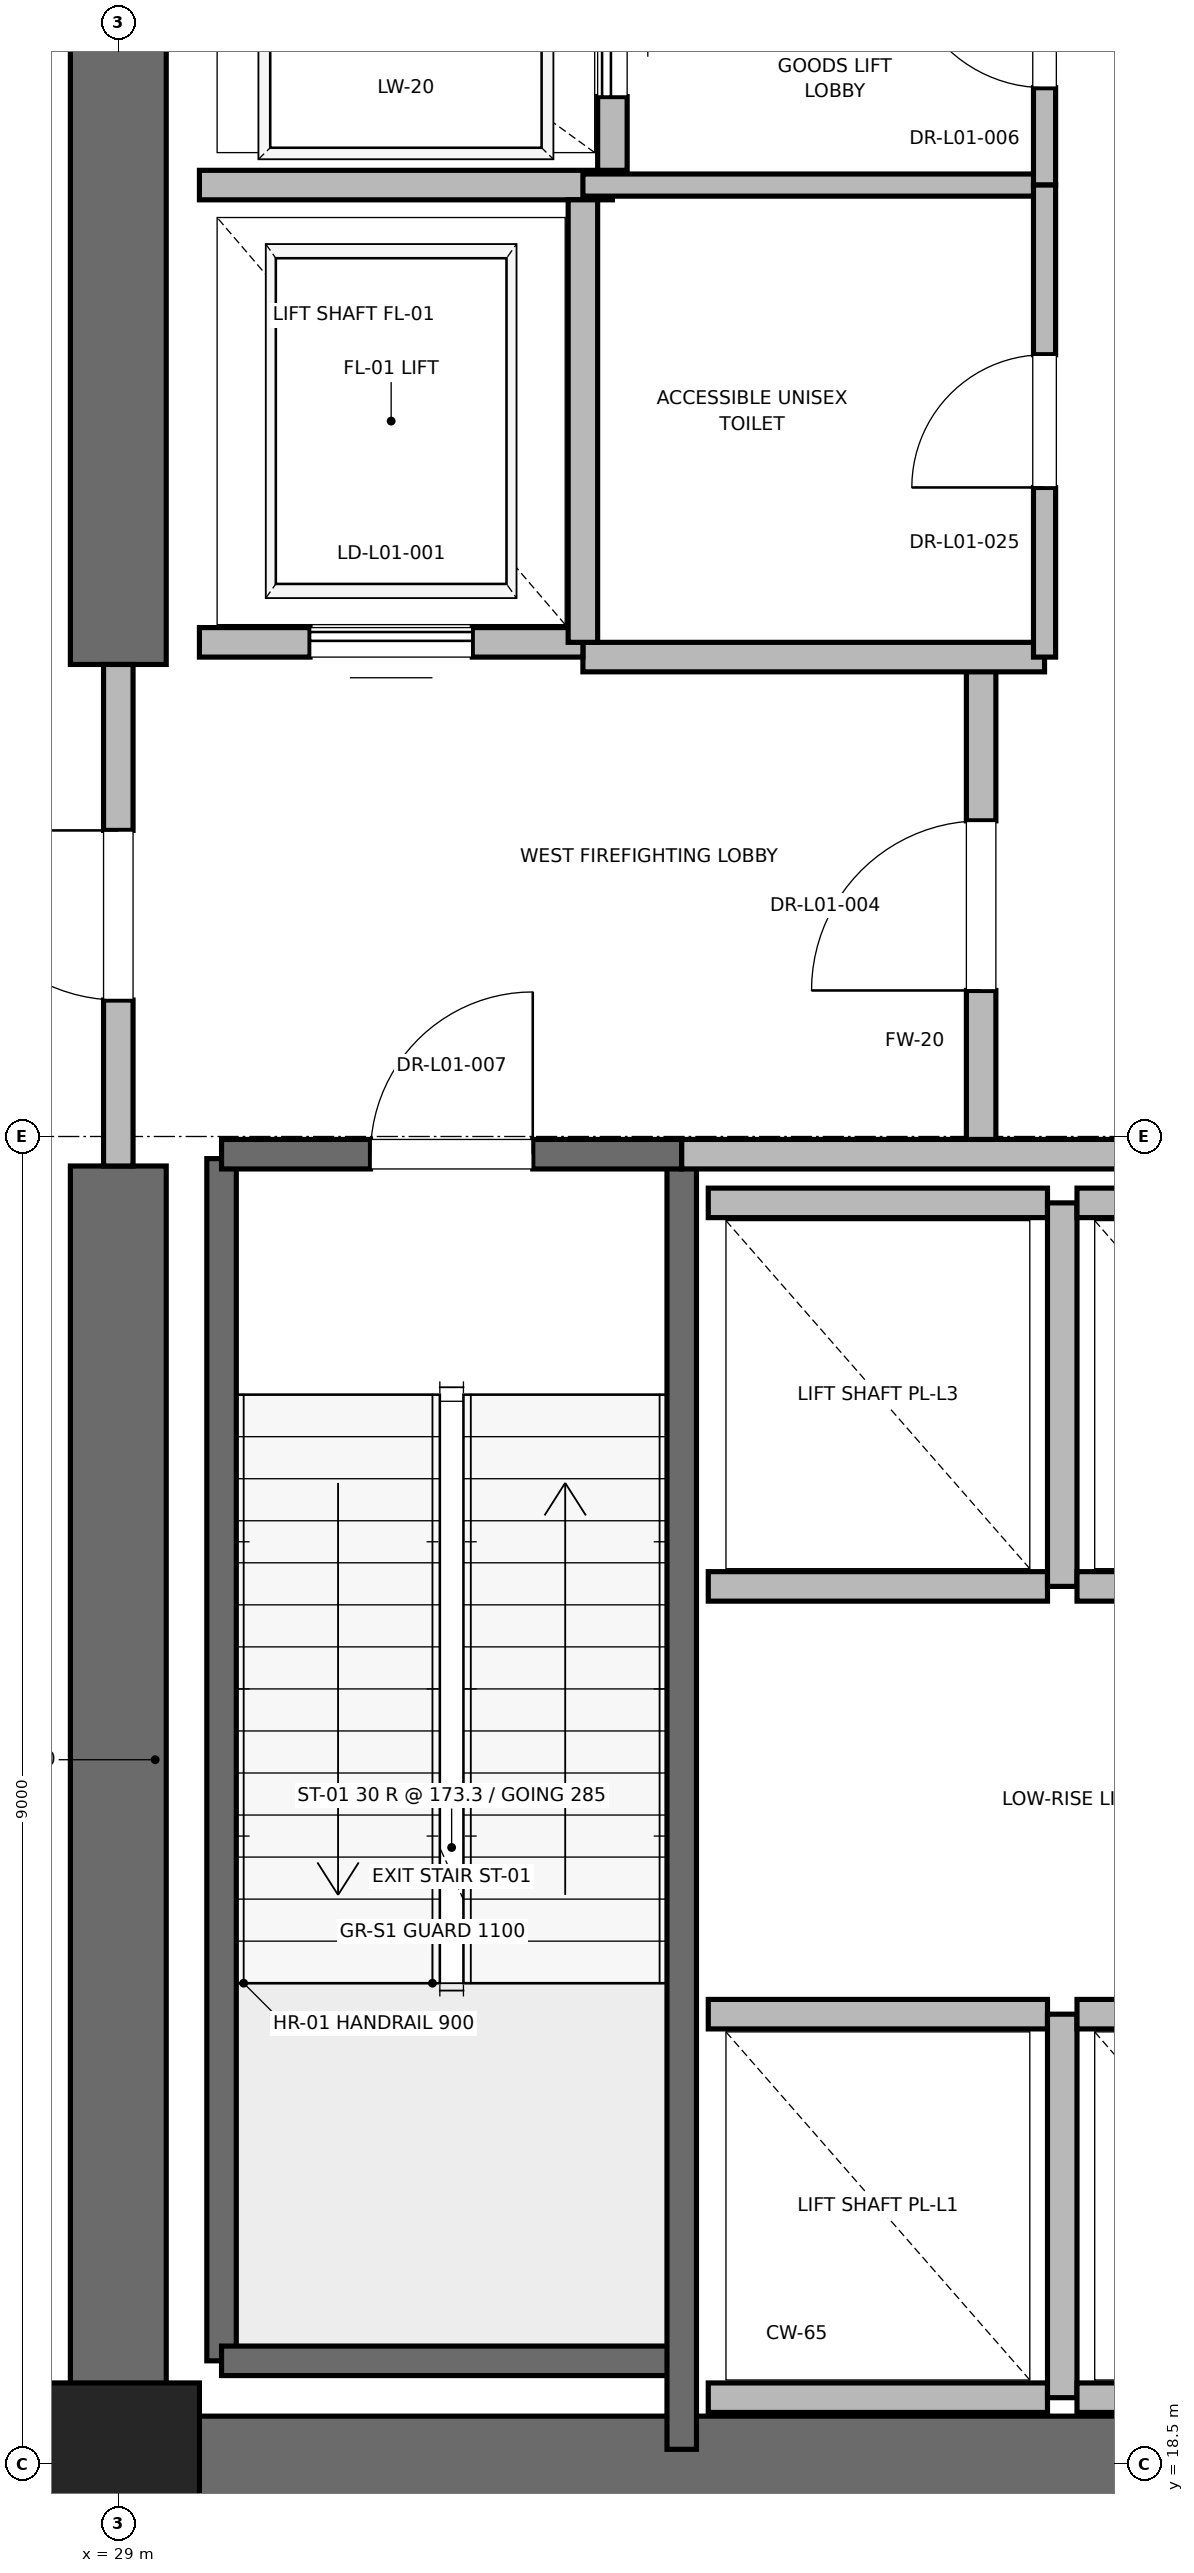
"""IFC4 building model, lengths in metres.
Left out: names, types, materials, properties, quantities, classifications, styles, units other than length and angle.
Written with IfcOpenShell. Run it as: python <this file> out.ifc"""

import sys

from ifc_helpers import new_model, si_unit, direction, frame, frame_2d, origin, origin_2d, place, context, subcontext, project, spatial, rectangle, extrude, element, fill, save


model = new_model("IFC4")
c1 = context("Model", 3, precision=1e-05, world=origin(), true_north=direction((0.0, 1.0)))
c2 = subcontext(c1, "Body", "Model", "MODEL_VIEW")
j1 = project(units=[si_unit("LENGTHUNIT", "METRE"), si_unit("PLANEANGLEUNIT", "RADIAN")], contexts=[c1])
p1 = place(None, origin())
s1 = spatial("IfcSite", under=j1, at=p1, CompositionType="ELEMENT")
p2 = place(p1, origin())
s2 = spatial("IfcBuilding", under=s1, at=p2, CompositionType="ELEMENT")
p3 = place(p2, frame((0.0, 0.0, 6.0)))
s3 = spatial("IfcBuildingStorey", under=s2, at=p3, CompositionType="ELEMENT", Elevation=6.0)
p4 = place(p3, frame((29.0, 18.5, 0.0), z_axis=(0.0, 0.0, 1.0), x_axis=(1.0, 0.0, 0.0)))
e1 = element("IfcColumn", 1, at=p4, inside=s3, PredefinedType="PILASTER", context=c2, shape_type="SweptSolid", body=[
    extrude(rectangle(XDim=1.1, YDim=1.1, at=origin_2d()), origin(), (0.0, 0.0, 1.0), 5.2),
])
p5 = place(p3, frame((29.0, 18.5, 0.0), z_axis=(0.0, 0.0, 1.0), x_axis=(1.0, 0.0, 0.0)))
e2 = element("IfcWall", 2, at=p5, inside=s3, PredefinedType="SHEAR", context=c2, shape_type="SweptSolid", body=[
    extrude(rectangle(XDim=9.2, YDim=0.65, at=frame_2d((4.6, 0.0))), origin(), (0.0, 0.0, 1.0), 4.92),
])
p6 = place(p3, frame((29.0, 18.5, 0.0), z_axis=(0.0, 0.0, 1.0), x_axis=(0.0, 1.0, 0.0)))
e3 = element("IfcWall", 3, at=p6, inside=s3, PredefinedType="SHEAR", context=c2, shape_type="SweptSolid", body=[
    extrude(rectangle(XDim=8.8, YDim=0.65, at=frame_2d((4.4, 0.0))), origin(), (0.0, 0.0, 1.0), 4.92),
])
p7 = place(p3, frame((29.0, 30.7, 0.0), z_axis=(0.0, 0.0, 1.0), x_axis=(0.0, 1.0, 0.0)))
e4 = element("IfcWall", 4, at=p7, inside=s3, PredefinedType="SHEAR", context=c2, shape_type="SweptSolid", body=[
    extrude(rectangle(XDim=5.8, YDim=0.65, at=frame_2d((2.9, 0.0))), origin(), (0.0, 0.0, 1.0), 4.92),
])
p8 = place(p3, frame((29.7, 19.2, 0.0), z_axis=(0.0, 0.0, 1.0), x_axis=(0.0, 1.0, 0.0)))
e5 = element("IfcWall", 5, at=p8, inside=s3, PredefinedType="SOLIDWALL", context=c2, shape_type="SweptSolid", body=[
    extrude(rectangle(XDim=8.15, YDim=0.2, at=frame_2d((4.075, 0.0))), origin(), (0.0, 0.0, 1.0), 4.92),
])
p9 = place(p3, frame((29.7, 19.2, 0.0), z_axis=(0.0, 0.0, 1.0), x_axis=(1.0, 0.0, 0.0)))
e6 = element("IfcWall", 6, at=p9, inside=s3, PredefinedType="SOLIDWALL", context=c2, shape_type="SweptSolid", body=[
    extrude(rectangle(XDim=3.12, YDim=0.2, at=frame_2d((1.56, 0.0))), origin(), (0.0, 0.0, 1.0), 4.92),
])
p10 = place(p3, frame((32.82, 18.6, 0.0), z_axis=(0.0, 0.0, 1.0), x_axis=(0.0, 1.0, 0.0)))
e7 = element("IfcWall", 7, at=p10, inside=s3, PredefinedType="SOLIDWALL", context=c2, shape_type="SweptSolid", body=[
    extrude(rectangle(XDim=8.78, YDim=0.2, at=frame_2d((4.39, 0.0))), origin(), (0.0, 0.0, 1.0), 4.92),
])
p11 = place(p3, frame((29.7, 27.38, 0.0), z_axis=(0.0, 0.0, 1.0), x_axis=(1.0, 0.0, 0.0)))
e8 = element("IfcWall", 8, at=p11, inside=s3, PredefinedType="SOLIDWALL", context=c2, shape_type="SweptSolid", body=[
    extrude(rectangle(XDim=3.12, YDim=0.2, at=frame_2d((1.56, 0.0))), origin(), (0.0, 0.0, 1.0), 4.92),
])
p12 = place(p11, frame((1.01, 0.0, 0.0)))
e9 = element("IfcOpeningElement", 9, at=p12, cuts=e8, PredefinedType="OPENING", context=c2, shape_type="SweptSolid", body=[
    extrude(rectangle(XDim=1.1, YDim=2.15, at=frame_2d((0.55, 1.075))), frame((0.0, 0.1, 0.0), z_axis=(0.0, -1.0, 0.0), x_axis=(1.0, 0.0, 0.0)), (0.0, 0.0, 1.0), 0.2),
])
p13 = place(p3, frame((34.85, 27.38, 0.0), z_axis=(0.0, 0.0, 1.0), x_axis=(0.0, 1.0, 0.0)))
e10 = element("IfcWall", 10, at=p13, inside=s3, PredefinedType="PARTITIONING", context=c2, shape_type="SweptSolid", body=[
    extrude(rectangle(XDim=3.37, YDim=0.2, at=frame_2d((1.685, 0.0))), origin(), (0.0, 0.0, 1.0), 4.92),
])
p14 = place(p13, frame((1.11, 0.0, 0.0)))
e11 = element("IfcOpeningElement", 11, at=p14, cuts=e10, PredefinedType="OPENING", context=c2, shape_type="SweptSolid", body=[
    extrude(rectangle(XDim=1.15, YDim=2.2, at=frame_2d((0.575, 1.1))), frame((0.0, 0.1, 0.0), z_axis=(0.0, -1.0, 0.0), x_axis=(1.0, 0.0, 0.0)), (0.0, 0.0, 1.0), 0.2),
])
p15 = place(p3, frame((29.0, 27.3, 0.0), z_axis=(0.0, 0.0, 1.0), x_axis=(0.0, 1.0, 0.0)))
e12 = element("IfcWall", 12, at=p15, inside=s3, PredefinedType="PARTITIONING", context=c2, shape_type="SweptSolid", body=[
    extrude(rectangle(XDim=3.4, YDim=0.2, at=frame_2d((1.7, 0.0))), origin(), (0.0, 0.0, 1.0), 3.7),
])
p16 = place(p15, frame((1.125, 0.0, 0.0)))
e13 = element("IfcOpeningElement", 13, at=p16, cuts=e12, PredefinedType="OPENING", context=c2, shape_type="SweptSolid", body=[
    extrude(rectangle(XDim=1.15, YDim=2.2, at=frame_2d((0.575, 1.1))), frame((0.0, 0.1, 0.0), z_axis=(0.0, -1.0, 0.0), x_axis=(1.0, 0.0, 0.0)), (0.0, 0.0, 1.0), 0.2),
])
p17 = place(p3, frame((32.82, 27.38, 0.0), z_axis=(0.0, 0.0, 1.0), x_axis=(1.0, 0.0, 0.0)))
e14 = element("IfcWall", 14, at=p17, inside=s3, PredefinedType="PARTITIONING", context=c2, shape_type="SweptSolid", body=[
    extrude(rectangle(XDim=5.62, YDim=0.2, at=frame_2d((2.81, 0.0))), origin(), (0.0, 0.0, 1.0), 4.92),
])
p18 = place(p3, frame((32.15, 30.75, 0.0), z_axis=(0.0, 0.0, 1.0), x_axis=(1.0, 0.0, 0.0)))
e15 = element("IfcWall", 15, at=p18, inside=s3, PredefinedType="PARTITIONING", context=c2, shape_type="SweptSolid", body=[
    extrude(rectangle(XDim=3.13, YDim=0.2, at=frame_2d((1.565, 0.0))), origin(), (0.0, 0.0, 1.0), 4.92),
])
p19 = place(p3, frame((29.55, 30.85, 0.0), z_axis=(0.0, 0.0, 1.0), x_axis=(1.0, 0.0, 0.0)))
e16 = element("IfcWall", 16, at=p19, inside=s3, PredefinedType="SOLIDWALL", context=c2, shape_type="SweptSolid", body=[
    extrude(rectangle(XDim=2.6, YDim=0.2, at=frame_2d((1.3, 0.0))), origin(), (0.0, 0.0, 1.0), 3.7),
])
p20 = place(p19, frame((0.75, 0.0, 0.0)))
e17 = element("IfcOpeningElement", 17, at=p20, cuts=e16, PredefinedType="OPENING", context=c2, shape_type="SweptSolid", body=[
    extrude(rectangle(XDim=1.1, YDim=2.2, at=frame_2d((0.55, 1.1))), frame((0.0, 0.1, 0.0), z_axis=(0.0, -1.0, 0.0), x_axis=(1.0, 0.0, 0.0)), (0.0, 0.0, 1.0), 0.2),
])
p21 = place(p3, frame((29.55, 33.95, 0.0), z_axis=(0.0, 0.0, 1.0), x_axis=(1.0, 0.0, 0.0)))
e18 = element("IfcWall", 18, at=p21, inside=s3, PredefinedType="SOLIDWALL", context=c2, shape_type="SweptSolid", body=[
    extrude(rectangle(XDim=2.8, YDim=0.2, at=frame_2d((1.4, 0.0))), origin(), (0.0, 0.0, 1.0), 4.92),
])
p22 = place(p3, frame((32.15, 30.85, 0.0), z_axis=(0.0, 0.0, 1.0), x_axis=(0.0, 1.0, 0.0)))
e19 = element("IfcWall", 19, at=p22, inside=s3, PredefinedType="SOLIDWALL", context=c2, shape_type="SweptSolid", body=[
    extrude(rectangle(XDim=3.0, YDim=0.2, at=frame_2d((1.5, 0.0))), origin(), (0.0, 0.0, 1.0), 4.92),
])
p23 = place(p3, frame((32.35, 34.05, 0.0), z_axis=(0.0, 0.0, 1.0), x_axis=(0.0, 1.0, 0.0)))
e20 = element("IfcWall", 20, at=p23, inside=s3, PredefinedType="SOLIDWALL", context=c2, shape_type="SweptSolid", body=[
    extrude(rectangle(XDim=2.1, YDim=0.2, at=frame_2d((1.05, 0.0))), origin(), (0.0, 0.0, 1.0), 4.92),
])
p24 = place(p23, frame((0.5, 0.0, 0.0)))
e21 = element("IfcOpeningElement", 21, at=p24, cuts=e20, PredefinedType="OPENING", context=c2, shape_type="SweptSolid", body=[
    extrude(rectangle(XDim=1.1, YDim=2.2, at=frame_2d((0.55, 1.1))), frame((0.0, 0.1, 0.0), z_axis=(0.0, -1.0, 0.0), x_axis=(1.0, 0.0, 0.0)), (0.0, 0.0, 1.0), 0.2),
])
for number, where, z_axis, x_axis in (
    (22, (33.0, 18.95, 0.0), (0.0, 0.0, 1.0), (1.0, 0.0, 0.0)),
    (23, (35.3, 21.55, 0.0), (0.0, 0.0, 1.0), (-1.0, 0.0, 0.0)),
):
    element("IfcWall", number, at=place(p3, frame(where, z_axis=z_axis, x_axis=x_axis)), inside=s3, PredefinedType="SOLIDWALL", context=c2, shape_type="SweptSolid", body=[
        extrude(rectangle(XDim=2.3, YDim=0.2, at=frame_2d((1.15, 0.0))), origin(), (0.0, 0.0, 1.0), 4.92),
    ])
p25 = place(p3, frame((35.4, 18.95, 0.0), z_axis=(0.0, 0.0, 1.0), x_axis=(0.0, 1.0, 0.0)))
e24 = element("IfcWall", 24, at=p25, inside=s3, PredefinedType="SOLIDWALL", context=c2, shape_type="SweptSolid", body=[
    extrude(rectangle(XDim=2.6, YDim=0.2, at=frame_2d((1.3, 0.0))), origin(), (0.0, 0.0, 1.0), 4.92),
])
p26 = place(p3, frame((35.5, 18.95, 0.0), z_axis=(0.0, 0.0, 1.0), x_axis=(1.0, 0.0, 0.0)))
e25 = element("IfcWall", 25, at=p26, inside=s3, PredefinedType="SOLIDWALL", context=c2, shape_type="SweptSolid", body=[
    extrude(rectangle(XDim=2.3, YDim=0.2, at=frame_2d((1.15, 0.0))), origin(), (0.0, 0.0, 1.0), 3.7),
])
for number, where, z_axis, x_axis in (
    (26, (37.8, 21.55, 0.0), (0.0, 0.0, 1.0), (-1.0, 0.0, 0.0)),
    (27, (33.0, 24.45, 0.0), (0.0, 0.0, 1.0), (1.0, 0.0, 0.0)),
    (28, (35.3, 27.05, 0.0), (0.0, 0.0, 1.0), (-1.0, 0.0, 0.0)),
):
    element("IfcWall", number, at=place(p3, frame(where, z_axis=z_axis, x_axis=x_axis)), inside=s3, PredefinedType="SOLIDWALL", context=c2, shape_type="SweptSolid", body=[
        extrude(rectangle(XDim=2.3, YDim=0.2, at=frame_2d((1.15, 0.0))), origin(), (0.0, 0.0, 1.0), 4.92),
    ])
p27 = place(p3, frame((35.4, 24.45, 0.0), z_axis=(0.0, 0.0, 1.0), x_axis=(0.0, 1.0, 0.0)))
e29 = element("IfcWall", 29, at=p27, inside=s3, PredefinedType="SOLIDWALL", context=c2, shape_type="SweptSolid", body=[
    extrude(rectangle(XDim=2.6, YDim=0.2, at=frame_2d((1.3, 0.0))), origin(), (0.0, 0.0, 1.0), 4.92),
])
for number, where, z_axis, x_axis in (
    (30, (35.5, 24.45, 0.0), (0.0, 0.0, 1.0), (1.0, 0.0, 0.0)),
    (31, (37.8, 27.05, 0.0), (0.0, 0.0, 1.0), (-1.0, 0.0, 0.0)),
):
    element("IfcWall", number, at=place(p3, frame(where, z_axis=z_axis, x_axis=x_axis)), inside=s3, PredefinedType="SOLIDWALL", context=c2, shape_type="SweptSolid", body=[
        extrude(rectangle(XDim=2.3, YDim=0.2, at=frame_2d((1.15, 0.0))), origin(), (0.0, 0.0, 1.0), 4.92),
    ])
p28 = place(p3, frame((32.15, 33.95, 0.0), z_axis=(0.0, 0.0, 1.0), x_axis=(1.0, 0.0, 0.0)))
e32 = element("IfcWall", 32, at=p28, inside=s3, PredefinedType="PARTITIONING", context=c2, shape_type="SweptSolid", body=[
    extrude(rectangle(XDim=3.13, YDim=0.15, at=frame_2d((1.565, 0.0))), origin(), (0.0, 0.0, 1.0), 2.85),
])
p29 = place(p3, frame((35.28, 33.95, 0.0), z_axis=(0.0, 0.0, 1.0), x_axis=(0.0, 1.0, 0.0)))
e33 = element("IfcWall", 33, at=p29, inside=s3, PredefinedType="PARTITIONING", context=c2, shape_type="SweptSolid", body=[
    extrude(rectangle(XDim=2.27, YDim=0.15, at=frame_2d((1.135, 0.0))), origin(), (0.0, 0.0, 1.0), 2.85),
])
p30 = place(p29, frame((0.66, 0.0, 0.0)))
e34 = element("IfcOpeningElement", 34, at=p30, cuts=e33, PredefinedType="OPENING", context=c2, shape_type="SweptSolid", body=[
    extrude(rectangle(XDim=0.95, YDim=2.15, at=frame_2d((0.475, 1.075))), frame((0.0, 0.075, 0.0), z_axis=(0.0, -1.0, 0.0), x_axis=(1.0, 0.0, 0.0)), (0.0, 0.0, 1.0), 0.15),
])
p31 = place(p3, frame((35.28, 30.75, 0.0), z_axis=(0.0, 0.0, 1.0), x_axis=(0.0, 1.0, 0.0)))
e35 = element("IfcWall", 35, at=p31, inside=s3, PredefinedType="PARTITIONING", context=c2, shape_type="SweptSolid", body=[
    extrude(rectangle(XDim=3.2, YDim=0.15, at=frame_2d((1.6, 0.0))), origin(), (0.0, 0.0, 1.0), 2.85),
])
p32 = place(p31, frame((1.15, 0.0, 0.0)))
e36 = element("IfcOpeningElement", 36, at=p32, cuts=e35, PredefinedType="OPENING", context=c2, shape_type="SweptSolid", body=[
    extrude(rectangle(XDim=0.9, YDim=2.1, at=frame_2d((0.45, 1.05))), frame((0.0, 0.075, 0.0), z_axis=(0.0, -1.0, 0.0), x_axis=(1.0, 0.0, 0.0)), (0.0, 0.0, 1.0), 0.15),
])
p33 = place(p12, origin())
e37 = element("IfcDoor", 37, at=p33, inside=s3, OperationType="SINGLE_SWING_RIGHT", PredefinedType="DOOR", context=c2, shape_type="SweptSolid", body=[
    extrude(rectangle(XDim=1.1, YDim=2.15, at=frame_2d((0.55, 1.075))), frame((0.0, 0.025, 0.0), z_axis=(0.0, -1.0, 0.0), x_axis=(1.0, 0.0, 0.0)), (0.0, 0.0, 1.0), 0.05),
])
fill(e9, e37)
p34 = place(p14, origin())
e38 = element("IfcDoor", 38, at=p34, inside=s3, OperationType="SINGLE_SWING_LEFT", PredefinedType="DOOR", context=c2, shape_type="SweptSolid", body=[
    extrude(rectangle(XDim=1.15, YDim=2.2, at=frame_2d((0.575, 1.1))), frame((0.0, 0.025, 0.0), z_axis=(0.0, -1.0, 0.0), x_axis=(1.0, 0.0, 0.0)), (0.0, 0.0, 1.0), 0.05),
])
fill(e11, e38)
p35 = place(p16, origin())
e39 = element("IfcDoor", 39, at=p35, inside=s3, OperationType="SINGLE_SWING_RIGHT", PredefinedType="DOOR", context=c2, shape_type="SweptSolid", body=[
    extrude(rectangle(XDim=1.15, YDim=2.2, at=frame_2d((0.575, 1.1))), frame((0.0, 0.025, 0.0), z_axis=(0.0, -1.0, 0.0), x_axis=(1.0, 0.0, 0.0)), (0.0, 0.0, 1.0), 0.05),
])
fill(e13, e39)
p36 = place(p20, origin())
e40 = element("IfcDoor", 40, at=p36, inside=s3, OperationType="SLIDING_TO_RIGHT", PredefinedType="DOOR", context=c2, shape_type="SweptSolid", body=[
    extrude(rectangle(XDim=1.1, YDim=2.2, at=frame_2d((0.55, 1.1))), frame((0.0, 0.025, 0.0), z_axis=(0.0, -1.0, 0.0), x_axis=(1.0, 0.0, 0.0)), (0.0, 0.0, 1.0), 0.05),
])
fill(e17, e40)
p37 = place(p24, origin())
e41 = element("IfcDoor", 41, at=p37, inside=s3, OperationType="SLIDING_TO_RIGHT", PredefinedType="DOOR", context=c2, shape_type="SweptSolid", body=[
    extrude(rectangle(XDim=1.1, YDim=2.2, at=frame_2d((0.55, 1.1))), frame((0.0, 0.025, 0.0), z_axis=(0.0, -1.0, 0.0), x_axis=(1.0, 0.0, 0.0)), (0.0, 0.0, 1.0), 0.05),
])
fill(e21, e41)
p38 = place(p30, origin())
e42 = element("IfcDoor", 42, at=p38, inside=s3, OperationType="SINGLE_SWING_RIGHT", PredefinedType="DOOR", context=c2, shape_type="SweptSolid", body=[
    extrude(rectangle(XDim=0.95, YDim=2.15, at=frame_2d((0.475, 1.075))), frame((0.0, 0.025, 0.0), z_axis=(0.0, -1.0, 0.0), x_axis=(1.0, 0.0, 0.0)), (0.0, 0.0, 1.0), 0.05),
])
fill(e34, e42)
p39 = place(p32, origin())
e43 = element("IfcDoor", 43, at=p39, inside=s3, OperationType="SINGLE_SWING_LEFT", PredefinedType="DOOR", context=c2, shape_type="SweptSolid", body=[
    extrude(rectangle(XDim=0.9, YDim=2.1, at=frame_2d((0.45, 1.05))), frame((0.0, 0.025, 0.0), z_axis=(0.0, -1.0, 0.0), x_axis=(1.0, 0.0, 0.0)), (0.0, 0.0, 1.0), 0.05),
])
fill(e36, e43)
save(model, sys.argv[1])
